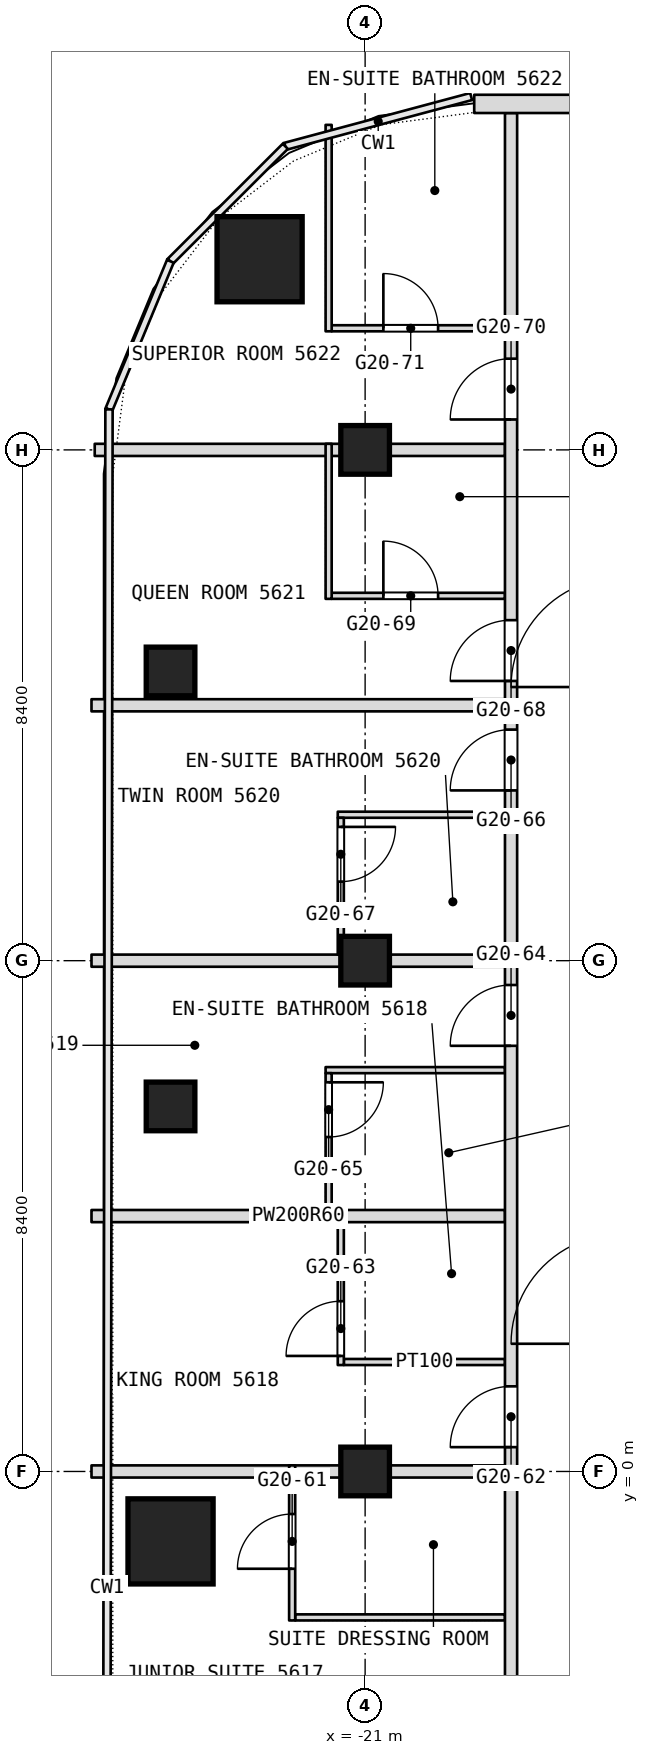
"""IFC4 building model, lengths in metres.
Left out: names, types, materials, properties, quantities, classifications, styles, units other than length and angle.
Written with IfcOpenShell. Run it as: python <this file> out.ifc"""

import sys

from ifc_helpers import new_model, si_unit, direction, frame, frame_2d, origin, origin_2d, place, context, subcontext, project, spatial, rectangle, extrude, element, fill, save


model = new_model("IFC4")
c1 = context("Model", 3, precision=1e-05, world=origin(), true_north=direction((0.0, 1.0)))
c2 = subcontext(c1, "Body", "Model", "MODEL_VIEW")
j1 = project(units=[si_unit("LENGTHUNIT", "METRE"), si_unit("PLANEANGLEUNIT", "RADIAN")], contexts=[c1])
p1 = place(None, origin())
s1 = spatial("IfcSite", under=j1, at=p1, CompositionType="ELEMENT")
p2 = place(p1, origin())
s2 = spatial("IfcBuilding", under=s1, at=p2, CompositionType="ELEMENT")
p3 = place(p2, frame((0.0, 0.0, 238.1)))
s3 = spatial("IfcBuildingStorey", under=s2, at=p3, CompositionType="ELEMENT", Elevation=238.1)
for number, where, z_axis, x_axis in (
    (1, (-22.736, 19.936, 0.0), (0.0, 0.0, 1.0), (1.0, 0.0, 0.0)),
    (2, (-24.2, -1.15, 0.0), (0.0, 0.0, 1.0), (1.0, 0.0, 0.0)),
):
    element("IfcColumn", number, at=place(p3, frame(where, z_axis=z_axis, x_axis=x_axis)), inside=s3, PredefinedType="COLUMN", context=c2, shape_type="SweptSolid", body=[
        extrude(rectangle(XDim=1.4, YDim=1.4, at=origin_2d()), origin(), (0.0, 0.0, 1.0), 3.6),
    ])
for number, where, z_axis, x_axis in (
    (3, (-21.0, 0.0, 0.0), (0.0, 0.0, 1.0), (1.0, 0.0, 0.0)),
    (4, (-21.0, 8.4, 0.0), (0.0, 0.0, 1.0), (1.0, 0.0, 0.0)),
    (5, (-21.0, 16.8, 0.0), (0.0, 0.0, 1.0), (1.0, 0.0, 0.0)),
    (6, (-24.2, 6.003, 0.0), (0.0, 0.0, 1.0), (1.0, 0.0, 0.0)),
    (7, (-24.2, 13.156, 0.0), (0.0, 0.0, 1.0), (1.0, 0.0, 0.0)),
):
    element("IfcColumn", number, at=place(p3, frame(where, z_axis=z_axis, x_axis=x_axis)), inside=s3, PredefinedType="COLUMN", context=c2, shape_type="SweptSolid", body=[
        extrude(rectangle(XDim=0.8, YDim=0.8, at=origin_2d()), origin(), (0.0, 0.0, 1.0), 3.6),
    ])
p4 = place(p3, frame((-22.15, -2.4, 0.0), z_axis=(0.0, 0.0, 1.0), x_axis=(1.0, 0.0, 0.0)))
e8 = element("IfcWall", 8, at=p4, inside=s3, PredefinedType="PARTITIONING", context=c2, shape_type="SweptSolid", body=[
    extrude(rectangle(XDim=3.45, YDim=0.1, at=frame_2d((1.725, 0.0))), origin(), (0.0, 0.0, 1.0), 3.34),
])
p5 = place(p3, frame((-25.5, 0.0, 0.0), z_axis=(0.0, 0.0, 1.0), x_axis=(1.0, 0.0, 0.0)))
e9 = element("IfcWall", 9, at=p5, inside=s3, PredefinedType="PARTITIONING", context=c2, shape_type="SweptSolid", body=[
    extrude(rectangle(XDim=6.8, YDim=0.2, at=frame_2d((3.4, 0.0))), origin(), (0.0, 0.0, 1.0), 2.94),
])
p6 = place(p3, frame((-21.35, 1.8, 0.0), z_axis=(0.0, 0.0, 1.0), x_axis=(1.0, 0.0, 0.0)))
e10 = element("IfcWall", 10, at=p6, inside=s3, PredefinedType="PARTITIONING", context=c2, shape_type="SweptSolid", body=[
    extrude(rectangle(XDim=2.65, YDim=0.1, at=frame_2d((1.325, 0.0))), origin(), (0.0, 0.0, 1.0), 3.34),
])
p7 = place(p3, frame((-25.5, 4.2, 0.0), z_axis=(0.0, 0.0, 1.0), x_axis=(1.0, 0.0, 0.0)))
e11 = element("IfcWall", 11, at=p7, inside=s3, PredefinedType="PARTITIONING", context=c2, shape_type="SweptSolid", body=[
    extrude(rectangle(XDim=6.8, YDim=0.2, at=frame_2d((3.4, 0.0))), origin(), (0.0, 0.0, 1.0), 3.34),
])
p8 = place(p3, frame((-21.65, 6.6, 0.0), z_axis=(0.0, 0.0, 1.0), x_axis=(1.0, 0.0, 0.0)))
e12 = element("IfcWall", 12, at=p8, inside=s3, PredefinedType="PARTITIONING", context=c2, shape_type="SweptSolid", body=[
    extrude(rectangle(XDim=2.95, YDim=0.1, at=frame_2d((1.475, 0.0))), origin(), (0.0, 0.0, 1.0), 3.34),
])
p9 = place(p3, frame((-25.5, 8.4, 0.0), z_axis=(0.0, 0.0, 1.0), x_axis=(1.0, 0.0, 0.0)))
e13 = element("IfcWall", 13, at=p9, inside=s3, PredefinedType="PARTITIONING", context=c2, shape_type="SweptSolid", body=[
    extrude(rectangle(XDim=6.8, YDim=0.2, at=frame_2d((3.4, 0.0))), origin(), (0.0, 0.0, 1.0), 2.94),
])
p10 = place(p3, frame((-21.45, 10.8, 0.0), z_axis=(0.0, 0.0, 1.0), x_axis=(1.0, 0.0, 0.0)))
e14 = element("IfcWall", 14, at=p10, inside=s3, PredefinedType="PARTITIONING", context=c2, shape_type="SweptSolid", body=[
    extrude(rectangle(XDim=2.75, YDim=0.1, at=frame_2d((1.375, 0.0))), origin(), (0.0, 0.0, 1.0), 3.34),
])
p11 = place(p3, frame((-25.5, 12.6, 0.0), z_axis=(0.0, 0.0, 1.0), x_axis=(1.0, 0.0, 0.0)))
e15 = element("IfcWall", 15, at=p11, inside=s3, PredefinedType="PARTITIONING", context=c2, shape_type="SweptSolid", body=[
    extrude(rectangle(XDim=6.8, YDim=0.2, at=frame_2d((3.4, 0.0))), origin(), (0.0, 0.0, 1.0), 3.34),
])
p12 = place(p3, frame((-21.55, 14.4, 0.0), z_axis=(0.0, 0.0, 1.0), x_axis=(1.0, 0.0, 0.0)))
e16 = element("IfcWall", 16, at=p12, inside=s3, PredefinedType="PARTITIONING", context=c2, shape_type="SweptSolid", body=[
    extrude(rectangle(XDim=2.85, YDim=0.1, at=frame_2d((1.425, 0.0))), origin(), (0.0, 0.0, 1.0), 3.34),
])
p13 = place(p12, frame((0.85, 0.0, 0.0)))
e17 = element("IfcOpeningElement", 17, at=p13, cuts=e16, PredefinedType="OPENING", context=c2, shape_type="SweptSolid", body=[
    extrude(rectangle(XDim=0.9, YDim=2.1, at=frame_2d((0.45, 1.05))), frame((0.0, 0.05, 0.0), z_axis=(0.0, -1.0, 0.0), x_axis=(1.0, 0.0, 0.0)), (0.0, 0.0, 1.0), 0.1),
])
p14 = place(p3, frame((-25.447, 16.8, 0.0), z_axis=(0.0, 0.0, 1.0), x_axis=(1.0, 0.0, 0.0)))
e18 = element("IfcWall", 18, at=p14, inside=s3, PredefinedType="PARTITIONING", context=c2, shape_type="SweptSolid", body=[
    extrude(rectangle(XDim=6.747, YDim=0.2, at=frame_2d((3.374, 0.0))), origin(), (0.0, 0.0, 1.0), 2.94),
])
p15 = place(p3, frame((-18.6, -26.751, 0.0), z_axis=(0.0, 0.0, 1.0), x_axis=(0.0, 1.0, 0.0)))
e19 = element("IfcWall", 19, at=p15, inside=s3, PredefinedType="PARTITIONING", context=c2, shape_type="SweptSolid", body=[
    extrude(rectangle(XDim=49.091, YDim=0.2, at=frame_2d((24.545, 0.0))), origin(), (0.0, 0.0, 1.0), 3.34),
])
p16 = place(p15, frame((3.413, 0.0, 0.0)))
e20 = element("IfcOpeningElement", 20, at=p16, cuts=e19, PredefinedType="OPENING", context=c2, shape_type="SweptSolid", body=[
    extrude(rectangle(XDim=1.0, YDim=2.1, at=frame_2d((0.5, 1.05))), frame((0.0, 0.1, 0.0), z_axis=(0.0, -1.0, 0.0), x_axis=(1.0, 0.0, 0.0)), (0.0, 0.0, 1.0), 0.2),
])
p17 = place(p15, frame((5.838, 0.0, 0.0)))
e21 = element("IfcOpeningElement", 21, at=p17, cuts=e19, PredefinedType="OPENING", context=c2, shape_type="SweptSolid", body=[
    extrude(rectangle(XDim=1.0, YDim=2.1, at=frame_2d((0.5, 1.05))), frame((0.0, 0.1, 0.0), z_axis=(0.0, -1.0, 0.0), x_axis=(1.0, 0.0, 0.0)), (0.0, 0.0, 1.0), 0.2),
])
p18 = place(p15, frame((13.551, 0.0, 0.0)))
e22 = element("IfcOpeningElement", 22, at=p18, cuts=e19, PredefinedType="OPENING", context=c2, shape_type="SweptSolid", body=[
    extrude(rectangle(XDim=1.1, YDim=2.1, at=frame_2d((0.55, 1.05))), frame((0.0, 0.1, 0.0), z_axis=(0.0, -1.0, 0.0), x_axis=(1.0, 0.0, 0.0)), (0.0, 0.0, 1.0), 0.2),
])
p19 = place(p15, frame((22.051, 0.0, 0.0)))
e23 = element("IfcOpeningElement", 23, at=p19, cuts=e19, PredefinedType="OPENING", context=c2, shape_type="SweptSolid", body=[
    extrude(rectangle(XDim=1.1, YDim=2.1, at=frame_2d((0.55, 1.05))), frame((0.0, 0.1, 0.0), z_axis=(0.0, -1.0, 0.0), x_axis=(1.0, 0.0, 0.0)), (0.0, 0.0, 1.0), 0.2),
])
p20 = place(p15, frame((27.151, 0.0, 0.0)))
e24 = element("IfcOpeningElement", 24, at=p20, cuts=e19, PredefinedType="OPENING", context=c2, shape_type="SweptSolid", body=[
    extrude(rectangle(XDim=1.0, YDim=2.1, at=frame_2d((0.5, 1.05))), frame((0.0, 0.1, 0.0), z_axis=(0.0, -1.0, 0.0), x_axis=(1.0, 0.0, 0.0)), (0.0, 0.0, 1.0), 0.2),
])
p21 = place(p15, frame((33.751, 0.0, 0.0)))
e25 = element("IfcOpeningElement", 25, at=p21, cuts=e19, PredefinedType="OPENING", context=c2, shape_type="SweptSolid", body=[
    extrude(rectangle(XDim=1.0, YDim=2.1, at=frame_2d((0.5, 1.05))), frame((0.0, 0.1, 0.0), z_axis=(0.0, -1.0, 0.0), x_axis=(1.0, 0.0, 0.0)), (0.0, 0.0, 1.0), 0.2),
])
p22 = place(p15, frame((37.951, 0.0, 0.0)))
e26 = element("IfcOpeningElement", 26, at=p22, cuts=e19, PredefinedType="OPENING", context=c2, shape_type="SweptSolid", body=[
    extrude(rectangle(XDim=1.0, YDim=2.1, at=frame_2d((0.5, 1.05))), frame((0.0, 0.1, 0.0), z_axis=(0.0, -1.0, 0.0), x_axis=(1.0, 0.0, 0.0)), (0.0, 0.0, 1.0), 0.2),
])
p23 = place(p15, frame((39.751, 0.0, 0.0)))
e27 = element("IfcOpeningElement", 27, at=p23, cuts=e19, PredefinedType="OPENING", context=c2, shape_type="SweptSolid", body=[
    extrude(rectangle(XDim=1.0, YDim=2.1, at=frame_2d((0.5, 1.05))), frame((0.0, 0.1, 0.0), z_axis=(0.0, -1.0, 0.0), x_axis=(1.0, 0.0, 0.0)), (0.0, 0.0, 1.0), 0.2),
])
p24 = place(p15, frame((44.051, 0.0, 0.0)))
e28 = element("IfcOpeningElement", 28, at=p24, cuts=e19, PredefinedType="OPENING", context=c2, shape_type="SweptSolid", body=[
    extrude(rectangle(XDim=1.0, YDim=2.1, at=frame_2d((0.5, 1.05))), frame((0.0, 0.1, 0.0), z_axis=(0.0, -1.0, 0.0), x_axis=(1.0, 0.0, 0.0)), (0.0, 0.0, 1.0), 0.2),
])
p25 = place(p3, frame((-21.55, 18.8, 0.0), z_axis=(0.0, 0.0, 1.0), x_axis=(1.0, 0.0, 0.0)))
e29 = element("IfcWall", 29, at=p25, inside=s3, PredefinedType="PARTITIONING", context=c2, shape_type="SweptSolid", body=[
    extrude(rectangle(XDim=2.85, YDim=0.1, at=frame_2d((1.425, 0.0))), origin(), (0.0, 0.0, 1.0), 3.34),
])
p26 = place(p25, frame((0.85, 0.0, 0.0)))
e30 = element("IfcOpeningElement", 30, at=p26, cuts=e29, PredefinedType="OPENING", context=c2, shape_type="SweptSolid", body=[
    extrude(rectangle(XDim=0.9, YDim=2.1, at=frame_2d((0.45, 1.05))), frame((0.0, 0.05, 0.0), z_axis=(0.0, -1.0, 0.0), x_axis=(1.0, 0.0, 0.0)), (0.0, 0.0, 1.0), 0.1),
])
p27 = place(p3, frame((-21.4, 1.75, 0.0), z_axis=(0.0, 0.0, 1.0), x_axis=(0.0, 1.0, 0.0)))
e31 = element("IfcWall", 31, at=p27, inside=s3, PredefinedType="PARTITIONING", context=c2, shape_type="SweptSolid", body=[
    extrude(rectangle(XDim=2.55, YDim=0.1, at=frame_2d((1.275, 0.0))), origin(), (0.0, 0.0, 1.0), 3.34),
])
p28 = place(p27, frame((0.15, 0.0, 0.0)))
e32 = element("IfcOpeningElement", 32, at=p28, cuts=e31, PredefinedType="OPENING", context=c2, shape_type="SweptSolid", body=[
    extrude(rectangle(XDim=0.9, YDim=2.1, at=frame_2d((0.45, 1.05))), frame((0.0, 0.05, 0.0), z_axis=(0.0, -1.0, 0.0), x_axis=(1.0, 0.0, 0.0)), (0.0, 0.0, 1.0), 0.1),
])
p29 = place(p3, frame((-21.4, 8.5, 0.0), z_axis=(0.0, 0.0, 1.0), x_axis=(0.0, 1.0, 0.0)))
e33 = element("IfcWall", 33, at=p29, inside=s3, PredefinedType="PARTITIONING", context=c2, shape_type="SweptSolid", body=[
    extrude(rectangle(XDim=2.25, YDim=0.1, at=frame_2d((1.125, 0.0))), origin(), (0.0, 0.0, 1.0), 3.34),
])
p30 = place(p29, frame((1.2, 0.0, 0.0)))
e34 = element("IfcOpeningElement", 34, at=p30, cuts=e33, PredefinedType="OPENING", context=c2, shape_type="SweptSolid", body=[
    extrude(rectangle(XDim=0.9, YDim=2.1, at=frame_2d((0.45, 1.05))), frame((0.0, 0.05, 0.0), z_axis=(0.0, -1.0, 0.0), x_axis=(1.0, 0.0, 0.0)), (0.0, 0.0, 1.0), 0.1),
])
p31 = place(p3, frame((-21.6, 4.3, 0.0), z_axis=(0.0, 0.0, 1.0), x_axis=(0.0, 1.0, 0.0)))
e35 = element("IfcWall", 35, at=p31, inside=s3, PredefinedType="PARTITIONING", context=c2, shape_type="SweptSolid", body=[
    extrude(rectangle(XDim=2.25, YDim=0.1, at=frame_2d((1.125, 0.0))), origin(), (0.0, 0.0, 1.0), 3.34),
])
p32 = place(p31, frame((1.2, 0.0, 0.0)))
e36 = element("IfcOpeningElement", 36, at=p32, cuts=e35, PredefinedType="OPENING", context=c2, shape_type="SweptSolid", body=[
    extrude(rectangle(XDim=0.9, YDim=2.1, at=frame_2d((0.45, 1.05))), frame((0.0, 0.05, 0.0), z_axis=(0.0, -1.0, 0.0), x_axis=(1.0, 0.0, 0.0)), (0.0, 0.0, 1.0), 0.1),
])
p33 = place(p3, frame((-21.6, 14.35, 0.0), z_axis=(0.0, 0.0, 1.0), x_axis=(0.0, 1.0, 0.0)))
e37 = element("IfcWall", 37, at=p33, inside=s3, PredefinedType="PARTITIONING", context=c2, shape_type="SweptSolid", body=[
    extrude(rectangle(XDim=2.55, YDim=0.1, at=frame_2d((1.275, 0.0))), origin(), (0.0, 0.0, 1.0), 3.34),
])
p34 = place(p3, frame((-21.6, 18.75, 0.0), z_axis=(0.0, 0.0, 1.0), x_axis=(0.0, 1.0, 0.0)))
e38 = element("IfcWall", 38, at=p34, inside=s3, PredefinedType="PARTITIONING", context=c2, shape_type="SweptSolid", body=[
    extrude(rectangle(XDim=3.395, YDim=0.1, at=frame_2d((1.698, 0.0))), origin(), (0.0, 0.0, 1.0), 3.34),
])
p35 = place(p3, frame((-22.2, -2.45, 0.0), z_axis=(0.0, 0.0, 1.0), x_axis=(0.0, 1.0, 0.0)))
e39 = element("IfcWall", 39, at=p35, inside=s3, PredefinedType="PARTITIONING", context=c2, shape_type="SweptSolid", body=[
    extrude(rectangle(XDim=2.55, YDim=0.1, at=frame_2d((1.275, 0.0))), origin(), (0.0, 0.0, 1.0), 3.34),
])
p36 = place(p35, frame((0.85, 0.0, 0.0)))
e40 = element("IfcOpeningElement", 40, at=p36, cuts=e39, PredefinedType="OPENING", context=c2, shape_type="SweptSolid", body=[
    extrude(rectangle(XDim=0.9, YDim=2.1, at=frame_2d((0.45, 1.05))), frame((0.0, 0.05, 0.0), z_axis=(0.0, -1.0, 0.0), x_axis=(1.0, 0.0, 0.0)), (0.0, 0.0, 1.0), 0.1),
])
p37 = place(p3, frame((19.206, 22.49, 0.0), z_axis=(0.0, 0.0, 1.0), x_axis=(-1.0, 0.0, 0.0)))
e41 = element("IfcWall", 41, at=p37, inside=s3, PredefinedType="NOTDEFINED", context=c2, shape_type="SweptSolid", body=[
    extrude(rectangle(XDim=38.412, YDim=0.3, at=frame_2d((19.206, 0.0))), origin(), (0.0, 0.0, 1.0), 3.6),
])
p38 = place(p37, frame((3.306, 0.0, 0.9)))
e42 = element("IfcOpeningElement", 42, at=p38, cuts=e41, PredefinedType="OPENING", context=c2, shape_type="SweptSolid", body=[
    extrude(rectangle(XDim=2.4, YDim=2.1, at=frame_2d((1.2, 1.05))), frame((0.0, 0.15, 0.0), z_axis=(0.0, -1.0, 0.0), x_axis=(1.0, 0.0, 0.0)), (0.0, 0.0, 1.0), 0.3),
])
p39 = place(p37, frame((7.506, 0.0, 0.9)))
e43 = element("IfcOpeningElement", 43, at=p39, cuts=e41, PredefinedType="OPENING", context=c2, shape_type="SweptSolid", body=[
    extrude(rectangle(XDim=2.4, YDim=2.1, at=frame_2d((1.2, 1.05))), frame((0.0, 0.15, 0.0), z_axis=(0.0, -1.0, 0.0), x_axis=(1.0, 0.0, 0.0)), (0.0, 0.0, 1.0), 0.3),
])
p40 = place(p37, frame((11.706, 0.0, 0.9)))
e44 = element("IfcOpeningElement", 44, at=p40, cuts=e41, PredefinedType="OPENING", context=c2, shape_type="SweptSolid", body=[
    extrude(rectangle(XDim=2.4, YDim=2.1, at=frame_2d((1.2, 1.05))), frame((0.0, 0.15, 0.0), z_axis=(0.0, -1.0, 0.0), x_axis=(1.0, 0.0, 0.0)), (0.0, 0.0, 1.0), 0.3),
])
p41 = place(p37, frame((15.906, 0.0, 0.9)))
e45 = element("IfcOpeningElement", 45, at=p41, cuts=e41, PredefinedType="OPENING", context=c2, shape_type="SweptSolid", body=[
    extrude(rectangle(XDim=2.4, YDim=2.1, at=frame_2d((1.2, 1.05))), frame((0.0, 0.15, 0.0), z_axis=(0.0, -1.0, 0.0), x_axis=(1.0, 0.0, 0.0)), (0.0, 0.0, 1.0), 0.3),
])
p42 = place(p37, frame((20.106, 0.0, 0.9)))
e46 = element("IfcOpeningElement", 46, at=p42, cuts=e41, PredefinedType="OPENING", context=c2, shape_type="SweptSolid", body=[
    extrude(rectangle(XDim=2.4, YDim=2.1, at=frame_2d((1.2, 1.05))), frame((0.0, 0.15, 0.0), z_axis=(0.0, -1.0, 0.0), x_axis=(1.0, 0.0, 0.0)), (0.0, 0.0, 1.0), 0.3),
])
p43 = place(p37, frame((24.306, 0.0, 0.9)))
e47 = element("IfcOpeningElement", 47, at=p43, cuts=e41, PredefinedType="OPENING", context=c2, shape_type="SweptSolid", body=[
    extrude(rectangle(XDim=2.4, YDim=2.1, at=frame_2d((1.2, 1.05))), frame((0.0, 0.15, 0.0), z_axis=(0.0, -1.0, 0.0), x_axis=(1.0, 0.0, 0.0)), (0.0, 0.0, 1.0), 0.3),
])
p44 = place(p37, frame((28.506, 0.0, 0.9)))
e48 = element("IfcOpeningElement", 48, at=p44, cuts=e41, PredefinedType="OPENING", context=c2, shape_type="SweptSolid", body=[
    extrude(rectangle(XDim=2.4, YDim=2.1, at=frame_2d((1.2, 1.05))), frame((0.0, 0.15, 0.0), z_axis=(0.0, -1.0, 0.0), x_axis=(1.0, 0.0, 0.0)), (0.0, 0.0, 1.0), 0.3),
])
p45 = place(p37, frame((32.706, 0.0, 0.9)))
e49 = element("IfcOpeningElement", 49, at=p45, cuts=e41, PredefinedType="OPENING", context=c2, shape_type="SweptSolid", body=[
    extrude(rectangle(XDim=2.4, YDim=2.1, at=frame_2d((1.2, 1.05))), frame((0.0, 0.15, 0.0), z_axis=(0.0, -1.0, 0.0), x_axis=(1.0, 0.0, 0.0)), (0.0, 0.0, 1.0), 0.3),
])
p46 = place(p13, origin())
e50 = element("IfcDoor", 50, at=p46, inside=s3, OperationType="SINGLE_SWING_LEFT", PredefinedType="DOOR", context=c2, shape_type="SweptSolid", body=[
    extrude(rectangle(XDim=0.9, YDim=2.1, at=frame_2d((0.45, 1.05))), frame((0.0, 0.025, 0.0), z_axis=(0.0, -1.0, 0.0), x_axis=(1.0, 0.0, 0.0)), (0.0, 0.0, 1.0), 0.05),
])
fill(e17, e50)
p47 = place(p20, origin())
e51 = element("IfcDoor", 51, at=p47, inside=s3, OperationType="SINGLE_SWING_LEFT", PredefinedType="DOOR", context=c2, shape_type="SweptSolid", body=[
    extrude(rectangle(XDim=1.0, YDim=2.1, at=frame_2d((0.5, 1.05))), frame((0.0, 0.025, 0.0), z_axis=(0.0, -1.0, 0.0), x_axis=(1.0, 0.0, 0.0)), (0.0, 0.0, 1.0), 0.05),
])
fill(e24, e51)
p48 = place(p21, origin())
e52 = element("IfcDoor", 52, at=p48, inside=s3, OperationType="SINGLE_SWING_LEFT", PredefinedType="DOOR", context=c2, shape_type="SweptSolid", body=[
    extrude(rectangle(XDim=1.0, YDim=2.1, at=frame_2d((0.5, 1.05))), frame((0.0, 0.025, 0.0), z_axis=(0.0, -1.0, 0.0), x_axis=(1.0, 0.0, 0.0)), (0.0, 0.0, 1.0), 0.05),
])
fill(e25, e52)
p49 = place(p22, origin())
e53 = element("IfcDoor", 53, at=p49, inside=s3, OperationType="SINGLE_SWING_LEFT", PredefinedType="DOOR", context=c2, shape_type="SweptSolid", body=[
    extrude(rectangle(XDim=1.0, YDim=2.1, at=frame_2d((0.5, 1.05))), frame((0.0, 0.025, 0.0), z_axis=(0.0, -1.0, 0.0), x_axis=(1.0, 0.0, 0.0)), (0.0, 0.0, 1.0), 0.05),
])
fill(e26, e53)
p50 = place(p23, origin())
e54 = element("IfcDoor", 54, at=p50, inside=s3, OperationType="SINGLE_SWING_LEFT", PredefinedType="DOOR", context=c2, shape_type="SweptSolid", body=[
    extrude(rectangle(XDim=1.0, YDim=2.1, at=frame_2d((0.5, 1.05))), frame((0.0, 0.025, 0.0), z_axis=(0.0, -1.0, 0.0), x_axis=(1.0, 0.0, 0.0)), (0.0, 0.0, 1.0), 0.05),
])
fill(e27, e54)
p51 = place(p24, origin())
e55 = element("IfcDoor", 55, at=p51, inside=s3, OperationType="SINGLE_SWING_LEFT", PredefinedType="DOOR", context=c2, shape_type="SweptSolid", body=[
    extrude(rectangle(XDim=1.0, YDim=2.1, at=frame_2d((0.5, 1.05))), frame((0.0, 0.025, 0.0), z_axis=(0.0, -1.0, 0.0), x_axis=(1.0, 0.0, 0.0)), (0.0, 0.0, 1.0), 0.05),
])
fill(e28, e55)
p52 = place(p26, origin())
e56 = element("IfcDoor", 56, at=p52, inside=s3, OperationType="SINGLE_SWING_LEFT", PredefinedType="DOOR", context=c2, shape_type="SweptSolid", body=[
    extrude(rectangle(XDim=0.9, YDim=2.1, at=frame_2d((0.45, 1.05))), frame((0.0, 0.025, 0.0), z_axis=(0.0, -1.0, 0.0), x_axis=(1.0, 0.0, 0.0)), (0.0, 0.0, 1.0), 0.05),
])
fill(e30, e56)
p53 = place(p28, origin())
e57 = element("IfcDoor", 57, at=p53, inside=s3, OperationType="SINGLE_SWING_RIGHT", PredefinedType="DOOR", context=c2, shape_type="SweptSolid", body=[
    extrude(rectangle(XDim=0.9, YDim=2.1, at=frame_2d((0.45, 1.05))), frame((0.0, 0.025, 0.0), z_axis=(0.0, -1.0, 0.0), x_axis=(1.0, 0.0, 0.0)), (0.0, 0.0, 1.0), 0.05),
])
fill(e32, e57)
p54 = place(p30, origin())
e58 = element("IfcDoor", 58, at=p54, inside=s3, OperationType="SINGLE_SWING_LEFT", PredefinedType="DOOR", context=c2, shape_type="SweptSolid", body=[
    extrude(rectangle(XDim=0.9, YDim=2.1, at=frame_2d((0.45, 1.05))), frame((0.0, 0.025, 0.0), z_axis=(0.0, -1.0, 0.0), x_axis=(1.0, 0.0, 0.0)), (0.0, 0.0, 1.0), 0.05),
])
fill(e34, e58)
p55 = place(p32, origin())
e59 = element("IfcDoor", 59, at=p55, inside=s3, OperationType="SINGLE_SWING_LEFT", PredefinedType="DOOR", context=c2, shape_type="SweptSolid", body=[
    extrude(rectangle(XDim=0.9, YDim=2.1, at=frame_2d((0.45, 1.05))), frame((0.0, 0.025, 0.0), z_axis=(0.0, -1.0, 0.0), x_axis=(1.0, 0.0, 0.0)), (0.0, 0.0, 1.0), 0.05),
])
fill(e36, e59)
p56 = place(p36, origin())
e60 = element("IfcDoor", 60, at=p56, inside=s3, OperationType="SINGLE_SWING_LEFT", PredefinedType="DOOR", context=c2, shape_type="SweptSolid", body=[
    extrude(rectangle(XDim=0.9, YDim=2.1, at=frame_2d((0.45, 1.05))), frame((0.0, 0.025, 0.0), z_axis=(0.0, -1.0, 0.0), x_axis=(1.0, 0.0, 0.0)), (0.0, 0.0, 1.0), 0.05),
])
fill(e40, e60)
save(model, sys.argv[1])
